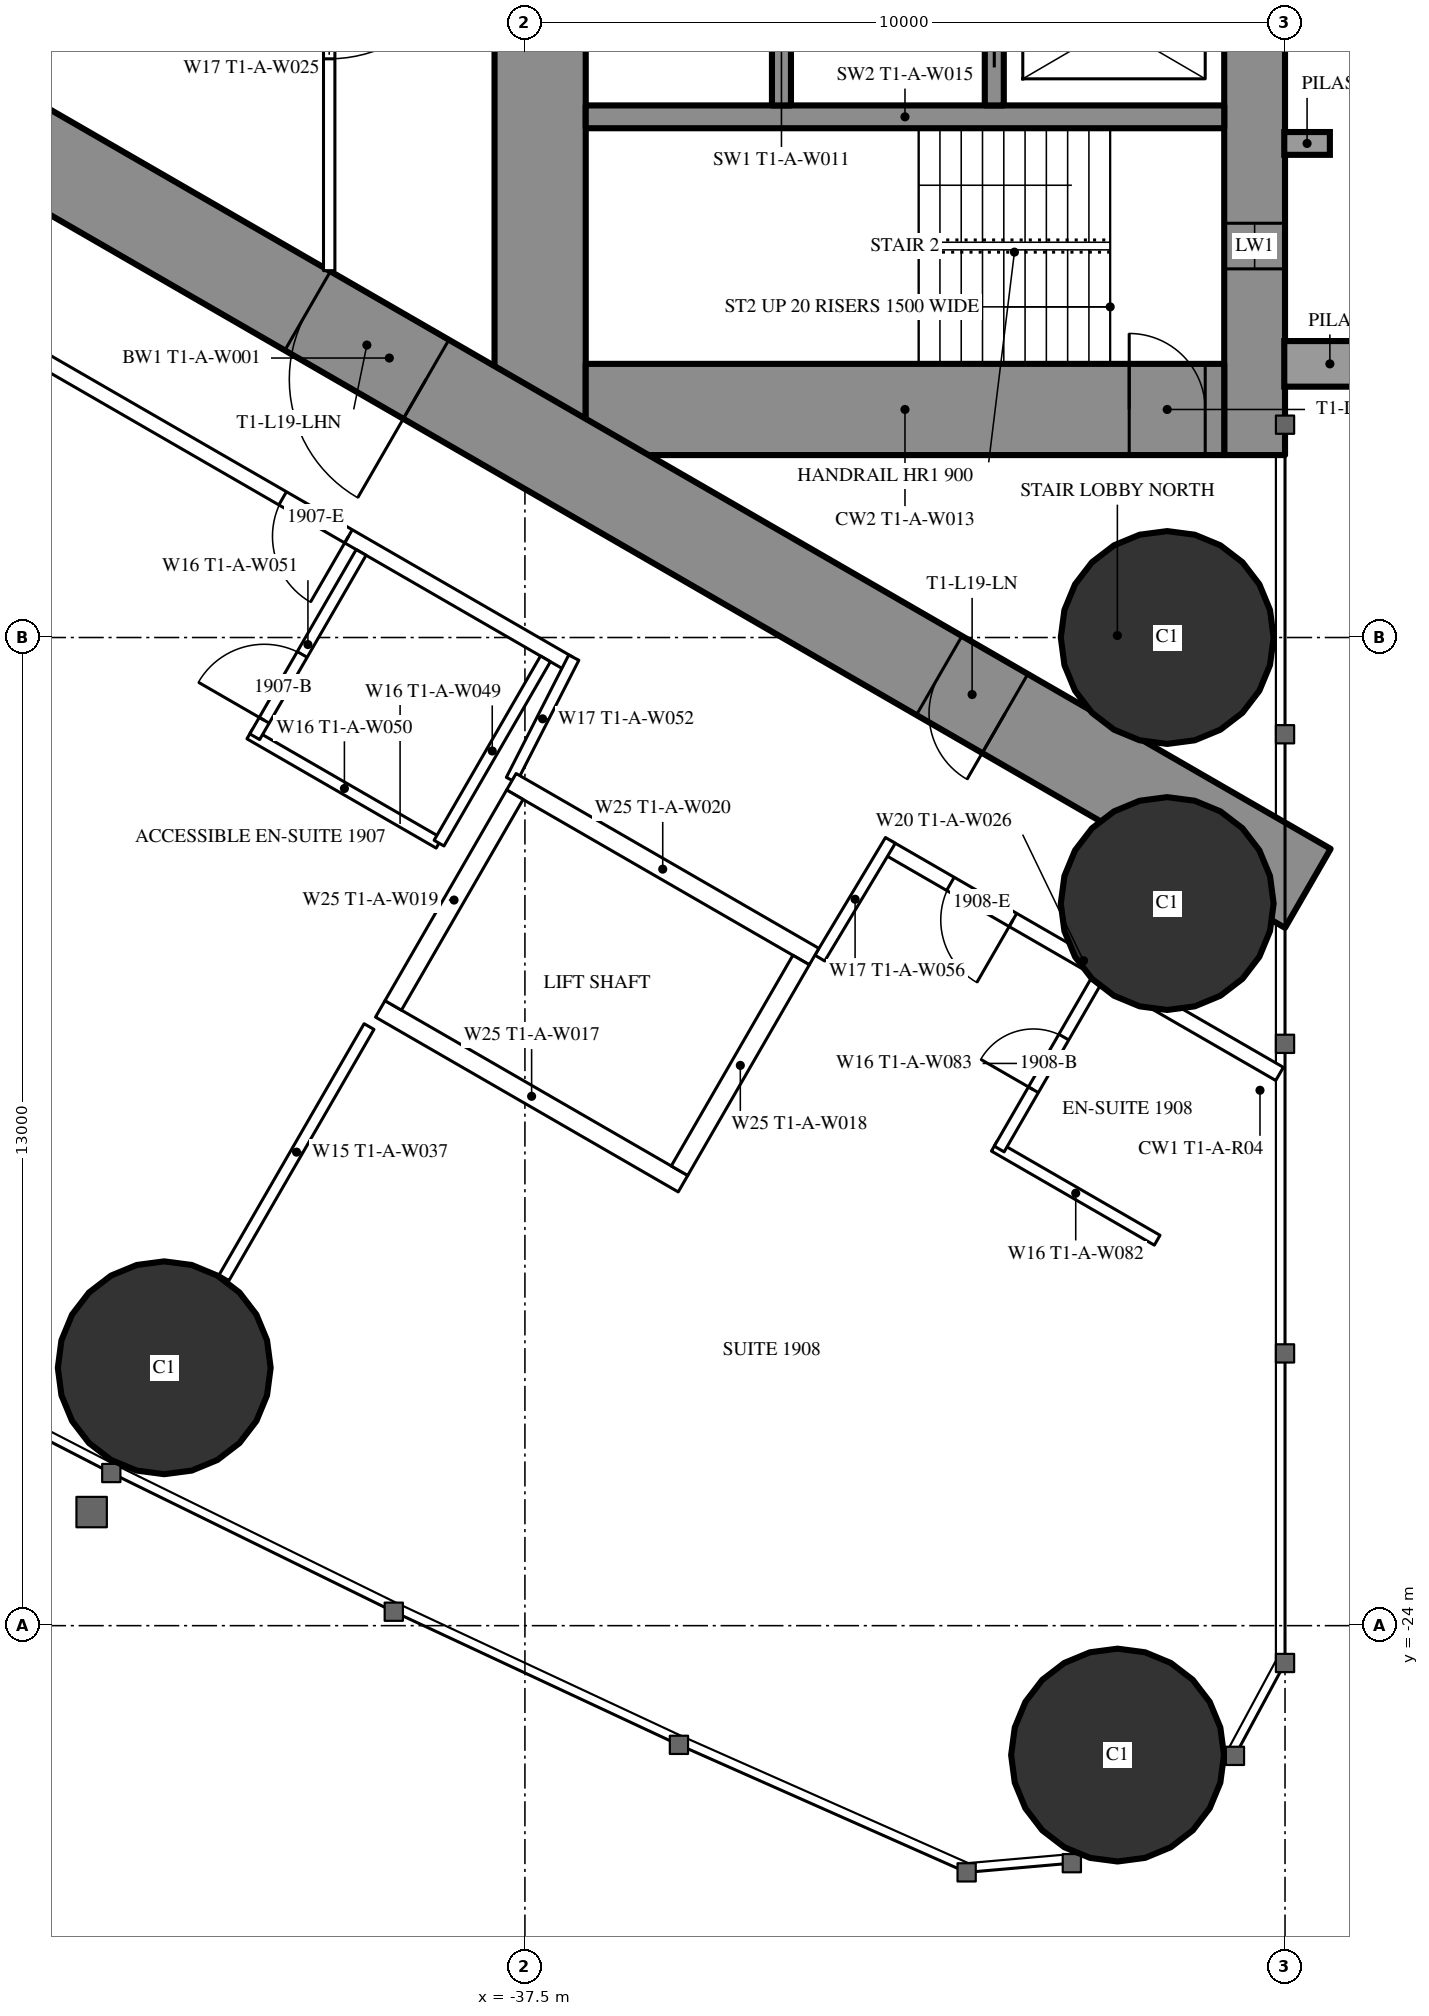
"""IFC4 building model, lengths in metres.
Left out: names, types, materials, properties, quantities, classifications, styles, units other than length and angle.
Written with IfcOpenShell. Run it as: python <this file> out.ifc"""

import sys

from ifc_helpers import new_model, si_unit, direction, frame, frame_2d, origin, origin_2d, place, context, subcontext, project, spatial, rectangle, hollow_circle, extrude, element, fill, save


model = new_model("IFC4")
c1 = context("Model", 3, precision=1e-05, world=origin(), true_north=direction((0.0, 1.0)))
c2 = subcontext(c1, "Body", "Model", "MODEL_VIEW")
j1 = project(units=[si_unit("LENGTHUNIT", "METRE"), si_unit("PLANEANGLEUNIT", "RADIAN")], contexts=[c1])
p1 = place(None, origin())
s1 = spatial("IfcSite", under=j1, at=p1, CompositionType="ELEMENT")
p2 = place(p1, origin())
s2 = spatial("IfcBuilding", under=s1, at=p2, CompositionType="ELEMENT")
p3 = place(p2, frame((0.0, 0.0, 74.0)))
s3 = spatial("IfcBuildingStorey", under=s2, at=p3, CompositionType="ELEMENT", Elevation=74.0)
for number, where, z_axis, x_axis in (
    (1, (-29.703, -25.703, 0.0), (0.0, 0.0, 1.0), (1.0, 0.0, 0.0)),
    (2, (-29.05, -11.0, 0.0), (0.0, 0.0, 1.0), (1.0, 0.0, 0.0)),
    (3, (-29.05, -14.5, 0.0), (0.0, 0.0, 1.0), (1.0, 0.0, 0.0)),
    (4, (-42.245, -20.607, 0.0), (0.0, 0.0, 1.0), (1.0, 0.0, 0.0)),
):
    element("IfcColumn", number, at=place(p3, frame(where, z_axis=z_axis, x_axis=x_axis)), inside=s3, PredefinedType="COLUMN", context=c2, shape_type="SweptSolid", body=[
        extrude(hollow_circle(Radius=1.4, WallThickness=0.12, at=origin_2d()), origin(), (0.0, 0.0, 1.0), 3.5),
    ])
p4 = place(p3, frame((-27.9, 8.6, 0.0), z_axis=(0.0, 0.0, 1.0), x_axis=(0.0, -1.0, 0.0)))
e5 = element("IfcWall", 5, at=p4, inside=s3, PredefinedType="SHEAR", context=c2, shape_type="SweptSolid", body=[
    extrude(rectangle(XDim=17.2, YDim=0.8, at=frame_2d((8.6, 0.0))), origin(), (0.0, 0.0, 1.0), 3.5),
])
p5 = place(p4, frame((2.45, 0.0, 0.6)))
e6 = element("IfcOpeningElement", 6, at=p5, cuts=e5, PredefinedType="OPENING", context=c2, shape_type="SweptSolid", body=[
    extrude(rectangle(XDim=0.6, YDim=2.1, at=frame_2d((0.3, 1.05))), frame((0.0, 0.41, 0.0), z_axis=(0.0, -1.0, 0.0), x_axis=(1.0, 0.0, 0.0)), (0.0, 0.0, 1.0), 0.82),
])
p6 = place(p4, frame((14.15, 0.0, 0.6)))
e7 = element("IfcOpeningElement", 7, at=p6, cuts=e5, PredefinedType="OPENING", context=c2, shape_type="SweptSolid", body=[
    extrude(rectangle(XDim=0.6, YDim=2.1, at=frame_2d((0.3, 1.05))), frame((0.0, 0.41, 0.0), z_axis=(0.0, -1.0, 0.0), x_axis=(1.0, 0.0, 0.0)), (0.0, 0.0, 1.0), 0.82),
])
p7 = place(p3, frame((-37.3, 8.6, 0.0), z_axis=(0.0, 0.0, 1.0), x_axis=(0.0, -1.0, 0.0)))
e8 = element("IfcWall", 8, at=p7, inside=s3, PredefinedType="SHEAR", context=c2, shape_type="SweptSolid", body=[
    extrude(rectangle(XDim=17.2, YDim=1.2, at=frame_2d((8.6, 0.0))), origin(), (0.0, 0.0, 1.0), 3.5),
])
p8 = place(p7, frame((7.7, 0.0, 0.0)))
e9 = element("IfcOpeningElement", 9, at=p8, cuts=e8, PredefinedType="OPENING", context=c2, shape_type="SweptSolid", body=[
    extrude(rectangle(XDim=1.8, YDim=2.2, at=frame_2d((0.9, 1.1))), frame((0.0, 0.61, 0.0), z_axis=(0.0, -1.0, 0.0), x_axis=(1.0, 0.0, 0.0)), (0.0, 0.0, 1.0), 1.22),
])
p9 = place(p3, frame((-28.3, -8.0, 0.0), z_axis=(0.0, 0.0, 1.0), x_axis=(-1.0, 0.0, 0.0)))
e10 = element("IfcWall", 10, at=p9, inside=s3, PredefinedType="SHEAR", context=c2, shape_type="SweptSolid", body=[
    extrude(rectangle(XDim=8.4, YDim=1.2, at=frame_2d((4.2, 0.0))), origin(), (0.0, 0.0, 1.0), 3.5),
])
p10 = place(p9, frame((0.25, 0.0, 0.0)))
e11 = element("IfcOpeningElement", 11, at=p10, cuts=e10, PredefinedType="OPENING", context=c2, shape_type="SweptSolid", body=[
    extrude(rectangle(XDim=1.0, YDim=2.2, at=frame_2d((0.5, 1.1))), frame((0.0, 0.61, 0.0), z_axis=(0.0, -1.0, 0.0), x_axis=(1.0, 0.0, 0.0)), (0.0, 0.0, 1.0), 1.22),
])
p11 = place(p3, frame((-28.3, -4.15, 0.0), z_axis=(0.0, 0.0, 1.0), x_axis=(-1.0, 0.0, 0.0)))
e12 = element("IfcWall", 12, at=p11, inside=s3, PredefinedType="SHEAR", context=c2, shape_type="SweptSolid", body=[
    extrude(rectangle(XDim=8.4, YDim=0.3, at=frame_2d((4.2, 0.0))), origin(), (0.0, 0.0, 1.0), 3.5),
])
p12 = place(p3, frame((-31.325, -1.9, 0.0), z_axis=(0.0, 0.0, 1.0), x_axis=(0.0, -1.0, 0.0)))
e13 = element("IfcWall", 13, at=p12, inside=s3, PredefinedType="SHEAR", context=c2, shape_type="SweptSolid", body=[
    extrude(rectangle(XDim=2.1, YDim=0.25, at=frame_2d((1.05, 0.0))), origin(), (0.0, 0.0, 1.0), 3.5),
])
p13 = place(p12, frame((0.5, 0.0, 0.0)))
e14 = element("IfcOpeningElement", 14, at=p13, cuts=e13, PredefinedType="OPENING", context=c2, shape_type="SweptSolid", body=[
    extrude(rectangle(XDim=1.1, YDim=2.2, at=frame_2d((0.55, 1.1))), frame((0.0, 0.135, 0.0), z_axis=(0.0, -1.0, 0.0), x_axis=(1.0, 0.0, 0.0)), (0.0, 0.0, 1.0), 0.27),
])
p14 = place(p3, frame((-34.125, -1.65, 0.0), z_axis=(0.0, 0.0, 1.0), x_axis=(0.0, -1.0, 0.0)))
e15 = element("IfcWall", 15, at=p14, inside=s3, PredefinedType="SHEAR", context=c2, shape_type="SweptSolid", body=[
    extrude(rectangle(XDim=2.35, YDim=0.25, at=frame_2d((1.175, 0.0))), origin(), (0.0, 0.0, 1.0), 3.5),
])
p15 = place(p3, frame((-27.2, -14.3, 0.0), z_axis=(0.0, 0.0, 1.0), x_axis=(-0.866024021859, 0.500002393557, 0.0)))
e16 = element("IfcWall", 16, at=p15, inside=s3, PredefinedType="SHEAR", context=c2, shape_type="SweptSolid", body=[
    extrude(rectangle(XDim=27.907, YDim=1.2, at=frame_2d((13.954, 0.0))), origin(), (0.0, 0.0, 1.0), 3.5),
])
p16 = place(p15, frame((4.6, 0.0, 0.0)))
e17 = element("IfcOpeningElement", 17, at=p16, cuts=e16, PredefinedType="OPENING", context=c2, shape_type="SweptSolid", body=[
    extrude(rectangle(XDim=1.0, YDim=2.2, at=frame_2d((0.5, 1.1))), frame((0.0, 0.61, 0.0), z_axis=(0.0, -1.0, 0.0), x_axis=(1.0, 0.0, 0.0)), (0.0, 0.0, 1.0), 1.22),
])
p17 = place(p15, frame((13.395, 0.0, 0.0)))
e18 = element("IfcOpeningElement", 18, at=p17, cuts=e16, PredefinedType="OPENING", context=c2, shape_type="SweptSolid", body=[
    extrude(rectangle(XDim=1.8, YDim=2.2, at=frame_2d((0.9, 1.1))), frame((0.0, 0.61, 0.0), z_axis=(0.0, -1.0, 0.0), x_axis=(1.0, 0.0, 0.0)), (0.0, 0.0, 1.0), 1.22),
])
p18 = place(p3, frame((-39.551, -16.118, 0.0), z_axis=(0.0, 0.0, 1.0), x_axis=(-0.499986503906, -0.866033195618, 0.0)))
e19 = element("IfcWall", 19, at=p18, inside=s3, PredefinedType="PARTITIONING", context=c2, shape_type="SweptSolid", body=[
    extrude(rectangle(XDim=3.815, YDim=0.15, at=frame_2d((1.907, 0.0))), origin(), (0.0, 0.0, 1.0), 3.25),
])
p19 = place(p3, frame((-27.572, -16.741, 0.0), z_axis=(0.0, 0.0, 1.0), x_axis=(-0.866024464444, 0.500001626982, 0.0)))
e20 = element("IfcWall", 20, at=p19, inside=s3, PredefinedType="PARTITIONING", context=c2, shape_type="SweptSolid", body=[
    extrude(rectangle(XDim=5.955, YDim=0.2, at=frame_2d((2.978, 0.0))), origin(), (0.0, 0.0, 1.0), 3.25),
])
p20 = place(p19, frame((4.05, 0.0, 0.0)))
e21 = element("IfcOpeningElement", 21, at=p20, cuts=e20, PredefinedType="OPENING", context=c2, shape_type="SweptSolid", body=[
    extrude(rectangle(XDim=0.95, YDim=2.2, at=frame_2d((0.475, 1.1))), frame((0.0, 0.11, 0.0), z_axis=(0.0, -1.0, 0.0), x_axis=(1.0, 0.0, 0.0)), (0.0, 0.0, 1.0), 0.22),
])
p21 = place(p3, frame((-36.92, -11.344, 0.0), z_axis=(0.0, 0.0, 1.0), x_axis=(-0.866028313256, 0.499994960614, 0.0)))
e22 = element("IfcWall", 22, at=p21, inside=s3, PredefinedType="PARTITIONING", context=c2, shape_type="SweptSolid", body=[
    extrude(rectangle(XDim=22.568, YDim=0.2, at=frame_2d((11.284, 0.0))), origin(), (0.0, 0.0, 1.0), 3.25),
])
p22 = place(p21, frame((20.958, 0.0, 0.0)))
e23 = element("IfcOpeningElement", 23, at=p22, cuts=e22, PredefinedType="OPENING", context=c2, shape_type="SweptSolid", body=[
    extrude(rectangle(XDim=0.95, YDim=2.2, at=frame_2d((0.475, 1.1))), frame((0.0, 0.11, 0.0), z_axis=(0.0, -1.0, 0.0), x_axis=(1.0, 0.0, 0.0)), (0.0, 0.0, 1.0), 0.22),
])
p23 = place(p21, frame((12.68, 0.0, 0.0)))
e24 = element("IfcOpeningElement", 24, at=p23, cuts=e22, PredefinedType="OPENING", context=c2, shape_type="SweptSolid", body=[
    extrude(rectangle(XDim=0.95, YDim=2.2, at=frame_2d((0.475, 1.1))), frame((0.0, 0.11, 0.0), z_axis=(0.0, -1.0, 0.0), x_axis=(1.0, 0.0, 0.0)), (0.0, 0.0, 1.0), 0.22),
])
p24 = place(p21, frame((3.35, 0.0, 0.0)))
e25 = element("IfcOpeningElement", 25, at=p24, cuts=e22, PredefinedType="OPENING", context=c2, shape_type="SweptSolid", body=[
    extrude(rectangle(XDim=1.0, YDim=2.2, at=frame_2d((0.5, 1.1))), frame((0.0, 0.11, 0.0), z_axis=(0.0, -1.0, 0.0), x_axis=(1.0, 0.0, 0.0)), (0.0, 0.0, 1.0), 0.22),
])
p25 = place(p3, frame((-36.857, -11.265, 0.0), z_axis=(0.0, 0.0, 1.0), x_axis=(-0.454225294761, -0.890886851176, 0.0)))
e26 = element("IfcWall", 26, at=p25, inside=s3, PredefinedType="PARTITIONING", context=c2, shape_type="SweptSolid", body=[
    extrude(rectangle(XDim=1.807, YDim=0.15, at=frame_2d((0.904, 0.0))), origin(), (0.0, 0.0, 1.0), 3.25),
])
p26 = place(p3, frame((-33.621, -15.218, 0.0), z_axis=(0.0, 0.0, 1.0), x_axis=(0.514336634837, 0.857588377991, 0.0)))
e27 = element("IfcWall", 27, at=p26, inside=s3, PredefinedType="PARTITIONING", context=c2, shape_type="SweptSolid", body=[
    extrude(rectangle(XDim=1.805, YDim=0.15, at=frame_2d((0.903, 0.0))), origin(), (0.0, 0.0, 1.0), 3.25),
])
p27 = place(p3, frame((-38.63, -13.705, 0.0), z_axis=(0.0, 0.0, 1.0), x_axis=(-0.866018712932, 0.500011588718, 0.0)))
e28 = element("IfcWall", 28, at=p27, inside=s3, PredefinedType="PARTITIONING", context=c2, shape_type="SweptSolid", body=[
    extrude(rectangle(XDim=2.875, YDim=0.15, at=frame_2d((1.438, 0.0))), origin(), (0.0, 0.0, 1.0), 3.25),
])
p28 = place(p3, frame((-39.655, -9.88, 0.0), z_axis=(0.0, 0.0, 1.0), x_axis=(-0.500049511043, -0.865996816683, 0.0)))
e29 = element("IfcWall", 29, at=p28, inside=s3, PredefinedType="PARTITIONING", context=c2, shape_type="SweptSolid", body=[
    extrude(rectangle(XDim=2.8, YDim=0.15, at=frame_2d((1.4, 0.0))), origin(), (0.0, 0.0, 1.0), 3.25),
])
p29 = place(p28, frame((1.55, 0.0, 0.0)))
e30 = element("IfcOpeningElement", 30, at=p29, cuts=e29, PredefinedType="OPENING", context=c2, shape_type="SweptSolid", body=[
    extrude(rectangle(XDim=1.0, YDim=2.2, at=frame_2d((0.5, 1.1))), frame((0.0, 0.085, 0.0), z_axis=(0.0, -1.0, 0.0), x_axis=(1.0, 0.0, 0.0)), (0.0, 0.0, 1.0), 0.17),
])
p30 = place(p3, frame((-37.23, -11.281, 0.0), z_axis=(0.0, 0.0, 1.0), x_axis=(-0.500049511043, -0.865996816683, 0.0)))
e31 = element("IfcWall", 31, at=p30, inside=s3, PredefinedType="PARTITIONING", context=c2, shape_type="SweptSolid", body=[
    extrude(rectangle(XDim=2.8, YDim=0.15, at=frame_2d((1.4, 0.0))), origin(), (0.0, 0.0, 1.0), 3.25),
])
p31 = place(p3, frame((-29.182, -18.929, 0.0), z_axis=(0.0, 0.0, 1.0), x_axis=(-0.866006523861, 0.500032699561, 0.0)))
e32 = element("IfcWall", 32, at=p31, inside=s3, PredefinedType="PARTITIONING", context=c2, shape_type="SweptSolid", body=[
    extrude(rectangle(XDim=2.475, YDim=0.15, at=frame_2d((1.237, 0.0))), origin(), (0.0, 0.0, 1.0), 3.25),
])
p32 = place(p3, frame((-29.96, -15.478, 0.0), z_axis=(0.0, 0.0, 1.0), x_axis=(-0.500006934395, -0.866021400173, 0.0)))
e33 = element("IfcWall", 33, at=p32, inside=s3, PredefinedType="PARTITIONING", context=c2, shape_type="SweptSolid", body=[
    extrude(rectangle(XDim=2.6, YDim=0.15, at=frame_2d((1.3, 0.0))), origin(), (0.0, 0.0, 1.0), 3.25),
])
p33 = place(p32, frame((0.9, 0.0, 0.0)))
e34 = element("IfcOpeningElement", 34, at=p33, cuts=e33, PredefinedType="OPENING", context=c2, shape_type="SweptSolid", body=[
    extrude(rectangle(XDim=0.8, YDim=2.2, at=frame_2d((0.4, 1.1))), frame((0.0, 0.085, 0.0), z_axis=(0.0, -1.0, 0.0), x_axis=(1.0, 0.0, 0.0)), (0.0, 0.0, 1.0), 0.17),
])
p34 = place(p3, frame((-40.075, 1.2, 0.0), z_axis=(0.0, 0.0, 1.0), x_axis=(0.0, -1.0, 0.0)))
e35 = element("IfcWall", 35, at=p34, inside=s3, PredefinedType="PARTITIONING", context=c2, shape_type="SweptSolid", body=[
    extrude(rectangle(XDim=7.374, YDim=0.15, at=frame_2d((3.687, 0.0))), origin(), (0.0, 0.0, 1.0), 3.25),
])
p35 = place(p34, frame((2.787, 0.0, 0.0)))
e36 = element("IfcOpeningElement", 36, at=p35, cuts=e35, PredefinedType="OPENING", context=c2, shape_type="SweptSolid", body=[
    extrude(rectangle(XDim=1.8, YDim=2.2, at=frame_2d((0.9, 1.1))), frame((0.0, 0.085, 0.0), z_axis=(0.0, -1.0, 0.0), x_axis=(1.0, 0.0, 0.0)), (0.0, 0.0, 1.0), 0.17),
])
p36 = place(p3, frame((-33.696, -15.197, 0.0), z_axis=(0.0, 0.0, 1.0), x_axis=(-0.865976953817, 0.500083908417, 0.0)))
e37 = element("IfcWall", 37, at=p36, inside=s3, PredefinedType="PARTITIONING", context=c2, shape_type="SweptSolid", body=[
    extrude(rectangle(XDim=4.599, YDim=0.25, at=frame_2d((2.3, 0.0))), origin(), (0.0, 0.0, 1.0), 3.25),
])
p37 = place(p3, frame((-35.42, -18.186, 0.0), z_axis=(0.0, 0.0, 1.0), x_axis=(-0.865990227814, 0.50006092162, 0.0)))
e38 = element("IfcWall", 38, at=p37, inside=s3, PredefinedType="PARTITIONING", context=c2, shape_type="SweptSolid", body=[
    extrude(rectangle(XDim=4.6, YDim=0.25, at=frame_2d((2.3, 0.0))), origin(), (0.0, 0.0, 1.0), 3.25),
])
p38 = place(p3, frame((-33.866, -15.243, 0.0), z_axis=(0.0, 0.0, 1.0), x_axis=(-0.499929347863, -0.866066190972, 0.0)))
e39 = element("IfcWall", 39, at=p38, inside=s3, PredefinedType="PARTITIONING", context=c2, shape_type="SweptSolid", body=[
    extrude(rectangle(XDim=3.201, YDim=0.25, at=frame_2d((1.6, 0.0))), origin(), (0.0, 0.0, 1.0), 3.25),
])
p39 = place(p3, frame((-37.633, -13.068, 0.0), z_axis=(0.0, 0.0, 1.0), x_axis=(-0.499872130319, -0.866099216793, 0.0)))
e40 = element("IfcWall", 40, at=p39, inside=s3, PredefinedType="PARTITIONING", context=c2, shape_type="SweptSolid", body=[
    extrude(rectangle(XDim=3.2, YDim=0.25, at=frame_2d((1.6, 0.0))), origin(), (0.0, 0.0, 1.0), 3.25),
])
p40 = place(p29, origin())
e41 = element("IfcDoor", 41, at=p40, inside=s3, OperationType="SINGLE_SWING_RIGHT", PredefinedType="DOOR", context=c2, shape_type="SweptSolid", body=[
    extrude(rectangle(XDim=1.0, YDim=2.2, at=frame_2d((0.5, 1.1))), frame((0.0, 0.025, 0.0), z_axis=(0.0, -1.0, 0.0), x_axis=(1.0, 0.0, 0.0)), (0.0, 0.0, 1.0), 0.05),
])
fill(e30, e41)
p41 = place(p24, origin())
e42 = element("IfcDoor", 42, at=p41, inside=s3, OperationType="SINGLE_SWING_LEFT", PredefinedType="DOOR", context=c2, shape_type="SweptSolid", body=[
    extrude(rectangle(XDim=1.0, YDim=2.2, at=frame_2d((0.5, 1.1))), frame((0.0, 0.025, 0.0), z_axis=(0.0, -1.0, 0.0), x_axis=(1.0, 0.0, 0.0)), (0.0, 0.0, 1.0), 0.05),
])
fill(e25, e42)
p42 = place(p33, origin())
e43 = element("IfcDoor", 43, at=p42, inside=s3, OperationType="SINGLE_SWING_RIGHT", PredefinedType="DOOR", context=c2, shape_type="SweptSolid", body=[
    extrude(rectangle(XDim=0.8, YDim=2.2, at=frame_2d((0.4, 1.1))), frame((0.0, 0.025, 0.0), z_axis=(0.0, -1.0, 0.0), x_axis=(1.0, 0.0, 0.0)), (0.0, 0.0, 1.0), 0.05),
])
fill(e34, e43)
p43 = place(p20, origin())
e44 = element("IfcDoor", 44, at=p43, inside=s3, OperationType="SINGLE_SWING_LEFT", PredefinedType="DOOR", context=c2, shape_type="SweptSolid", body=[
    extrude(rectangle(XDim=0.95, YDim=2.2, at=frame_2d((0.475, 1.1))), frame((0.0, 0.025, 0.0), z_axis=(0.0, -1.0, 0.0), x_axis=(1.0, 0.0, 0.0)), (0.0, 0.0, 1.0), 0.05),
])
fill(e21, e44)
p44 = place(p35, origin())
e45 = element("IfcDoor", 45, at=p44, inside=s3, OperationType="DOUBLE_DOOR_SINGLE_SWING", PredefinedType="DOOR", context=c2, shape_type="SweptSolid", body=[
    extrude(rectangle(XDim=1.8, YDim=2.2, at=frame_2d((0.9, 1.1))), frame((0.0, 0.025, 0.0), z_axis=(0.0, -1.0, 0.0), x_axis=(1.0, 0.0, 0.0)), (0.0, 0.0, 1.0), 0.05),
])
fill(e36, e45)
p45 = place(p16, origin())
e46 = element("IfcDoor", 46, at=p45, inside=s3, OperationType="SINGLE_SWING_LEFT", PredefinedType="DOOR", context=c2, shape_type="SweptSolid", body=[
    extrude(rectangle(XDim=1.0, YDim=2.2, at=frame_2d((0.5, 1.1))), frame((0.0, 0.025, 0.0), z_axis=(0.0, -1.0, 0.0), x_axis=(1.0, 0.0, 0.0)), (0.0, 0.0, 1.0), 0.05),
])
fill(e17, e46)
p46 = place(p17, origin())
e47 = element("IfcDoor", 47, at=p46, inside=s3, OperationType="DOUBLE_DOOR_SINGLE_SWING", PredefinedType="DOOR", context=c2, shape_type="SweptSolid", body=[
    extrude(rectangle(XDim=1.8, YDim=2.2, at=frame_2d((0.9, 1.1))), frame((0.0, 0.025, 0.0), z_axis=(0.0, -1.0, 0.0), x_axis=(1.0, 0.0, 0.0)), (0.0, 0.0, 1.0), 0.05),
])
fill(e18, e47)
p47 = place(p10, origin())
e48 = element("IfcDoor", 48, at=p47, inside=s3, OperationType="SINGLE_SWING_RIGHT", PredefinedType="DOOR", context=c2, shape_type="SweptSolid", body=[
    extrude(rectangle(XDim=1.0, YDim=2.2, at=frame_2d((0.5, 1.1))), frame((0.0, 0.025, 0.0), z_axis=(0.0, -1.0, 0.0), x_axis=(1.0, 0.0, 0.0)), (0.0, 0.0, 1.0), 0.05),
])
fill(e11, e48)
p48 = place(p13, origin())
e49 = element("IfcDoor", 49, at=p48, inside=s3, OperationType="SLIDING_TO_LEFT", PredefinedType="USERDEFINED", context=c2, shape_type="SweptSolid", body=[
    extrude(rectangle(XDim=1.1, YDim=2.2, at=frame_2d((0.55, 1.1))), frame((0.0, 0.025, 0.0), z_axis=(0.0, -1.0, 0.0), x_axis=(1.0, 0.0, 0.0)), (0.0, 0.0, 1.0), 0.05),
])
fill(e14, e49)
p49 = place(p6, origin())
e50 = element("IfcWindow", 50, at=p49, inside=s3, PartitioningType="SINGLE_PANEL", PredefinedType="WINDOW", context=c2, shape_type="SweptSolid", body=[
    extrude(rectangle(XDim=0.6, YDim=2.1, at=frame_2d((0.3, 1.05))), frame((0.0, 0.03, 0.0), z_axis=(0.0, -1.0, 0.0), x_axis=(1.0, 0.0, 0.0)), (0.0, 0.0, 1.0), 0.06),
])
fill(e7, e50)
save(model, sys.argv[1])
